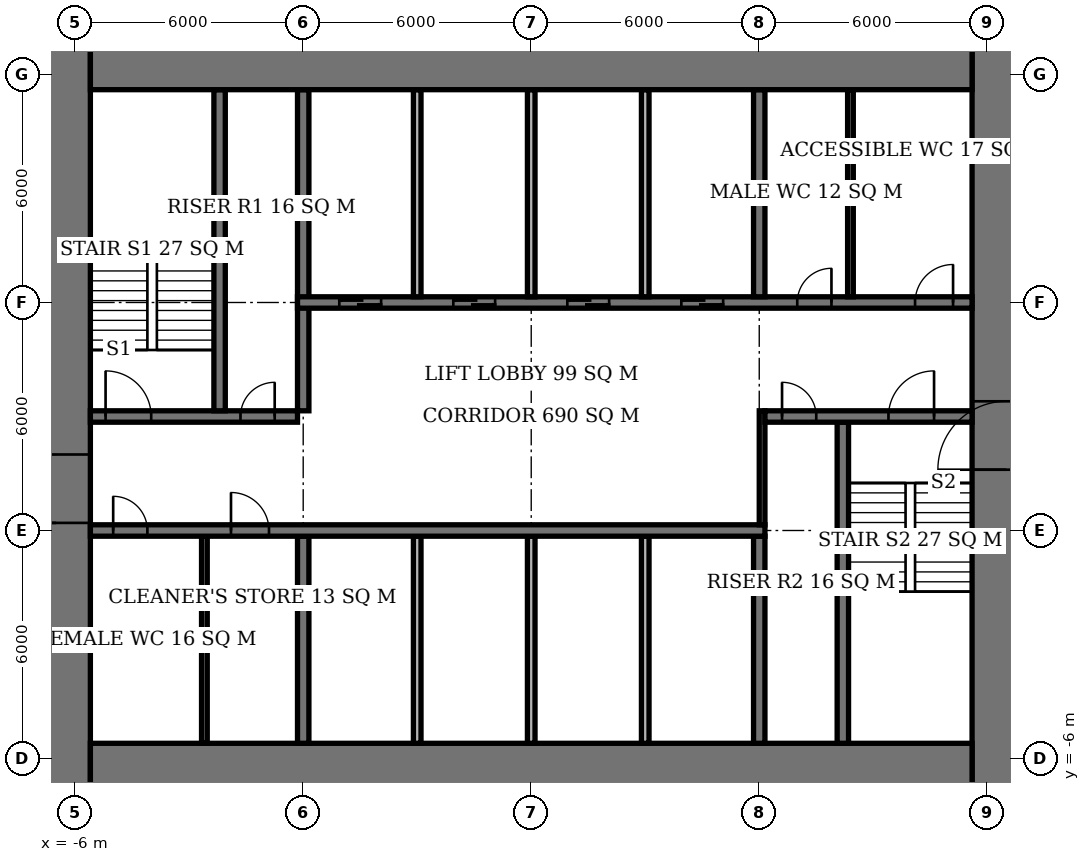
"""IFC4 building model, lengths in metres.
Left out: names, types, materials, properties, quantities, classifications, styles, units other than length and angle.
Written with IfcOpenShell. Run it as: python <this file> out.ifc"""

import sys

from ifc_helpers import new_model, si_unit, direction, frame, frame_2d, origin, place, context, subcontext, project, spatial, rectangle, extrude, element, fill, save


model = new_model("IFC4")
c1 = context("Model", 3, precision=1e-05, world=origin(), true_north=direction((0.0, 1.0)))
c2 = subcontext(c1, "Body", "Model", "MODEL_VIEW")
j1 = project(units=[si_unit("LENGTHUNIT", "METRE"), si_unit("PLANEANGLEUNIT", "RADIAN")], contexts=[c1])
p1 = place(None, origin())
s1 = spatial("IfcSite", under=j1, at=p1, CompositionType="ELEMENT")
p2 = place(p1, origin())
s2 = spatial("IfcBuilding", under=s1, at=p2, CompositionType="ELEMENT")
p3 = place(p2, frame((0.0, 0.0, 22.1)))
s3 = spatial("IfcBuildingStorey", under=s2, at=p3, CompositionType="ELEMENT", Elevation=22.1)
for number, where, z_axis, x_axis in (
    (1, (-5.6, -6.6, 0.0), (0.0, 0.0, 1.0), (1.0, 0.0, 0.0)),
    (2, (-5.6, 12.6, 0.0), (0.0, 0.0, 1.0), (1.0, 0.0, 0.0)),
):
    element("IfcWall", number, at=place(p3, frame(where, z_axis=z_axis, x_axis=x_axis)), inside=s3, PredefinedType="SHEAR", context=c2, shape_type="SweptSolid", body=[
        extrude(rectangle(XDim=23.2, YDim=2.0, at=frame_2d((11.6, 0.0))), origin(), (0.0, 0.0, 1.0), 3.9),
    ])
p4 = place(p3, frame((-6.5, -7.6, 0.0), z_axis=(0.0, 0.0, 1.0), x_axis=(0.0, 1.0, 0.0)))
e3 = element("IfcWall", 3, at=p4, inside=s3, PredefinedType="SHEAR", context=c2, shape_type="SweptSolid", body=[
    extrude(rectangle(XDim=21.2, YDim=1.8, at=frame_2d((10.6, 0.0))), origin(), (0.0, 0.0, 1.0), 3.9),
])
p5 = place(p4, frame((7.8, 0.0, 0.0)))
e4 = element("IfcOpeningElement", 4, at=p5, cuts=e3, PredefinedType="OPENING", context=c2, shape_type="SweptSolid", body=[
    extrude(rectangle(XDim=1.8, YDim=2.4, at=frame_2d((0.9, 1.2))), frame((0.0, 0.91, 0.0), z_axis=(0.0, -1.0, 0.0), x_axis=(1.0, 0.0, 0.0)), (0.0, 0.0, 1.0), 1.82),
])
p6 = place(p3, frame((18.5, -7.6, 0.0), z_axis=(0.0, 0.0, 1.0), x_axis=(0.0, 1.0, 0.0)))
e5 = element("IfcWall", 5, at=p6, inside=s3, PredefinedType="SHEAR", context=c2, shape_type="SweptSolid", body=[
    extrude(rectangle(XDim=21.2, YDim=1.8, at=frame_2d((10.6, 0.0))), origin(), (0.0, 0.0, 1.0), 3.9),
])
p7 = place(p6, frame((9.2, 0.0, 0.0)))
e6 = element("IfcOpeningElement", 6, at=p7, cuts=e5, PredefinedType="OPENING", context=c2, shape_type="SweptSolid", body=[
    extrude(rectangle(XDim=1.8, YDim=2.4, at=frame_2d((0.9, 1.2))), frame((0.0, 0.91, 0.0), z_axis=(0.0, -1.0, 0.0), x_axis=(1.0, 0.0, 0.0)), (0.0, 0.0, 1.0), 1.82),
])
p8 = place(p3, frame((-5.6, 0.0, 0.0), z_axis=(0.0, 0.0, 1.0), x_axis=(1.0, 0.0, 0.0)))
e7 = element("IfcWall", 7, at=p8, inside=s3, PredefinedType="SHEAR", context=c2, shape_type="SweptSolid", body=[
    extrude(rectangle(XDim=17.75, YDim=0.3, at=frame_2d((8.875, 0.0))), origin(), (0.0, 0.0, 1.0), 3.9),
])
p9 = place(p8, frame((0.6, 0.0, 0.0)))
e8 = element("IfcOpeningElement", 8, at=p9, cuts=e7, PredefinedType="OPENING", context=c2, shape_type="SweptSolid", body=[
    extrude(rectangle(XDim=0.9, YDim=2.1, at=frame_2d((0.45, 1.05))), frame((0.0, 0.16, 0.0), z_axis=(0.0, -1.0, 0.0), x_axis=(1.0, 0.0, 0.0)), (0.0, 0.0, 1.0), 0.32),
])
p10 = place(p8, frame((3.7, 0.0, 0.0)))
e9 = element("IfcOpeningElement", 9, at=p10, cuts=e7, PredefinedType="OPENING", context=c2, shape_type="SweptSolid", body=[
    extrude(rectangle(XDim=1.0, YDim=2.1, at=frame_2d((0.5, 1.05))), frame((0.0, 0.16, 0.0), z_axis=(0.0, -1.0, 0.0), x_axis=(1.0, 0.0, 0.0)), (0.0, 0.0, 1.0), 0.32),
])
p11 = place(p3, frame((-5.6, 3.0, 0.0), z_axis=(0.0, 0.0, 1.0), x_axis=(1.0, 0.0, 0.0)))
e10 = element("IfcWall", 10, at=p11, inside=s3, PredefinedType="SHEAR", context=c2, shape_type="SweptSolid", body=[
    extrude(rectangle(XDim=5.45, YDim=0.3, at=frame_2d((2.725, 0.0))), origin(), (0.0, 0.0, 1.0), 3.9),
])
p12 = place(p11, frame((0.4, 0.0, 0.0)))
e11 = element("IfcOpeningElement", 11, at=p12, cuts=e10, PredefinedType="OPENING", context=c2, shape_type="SweptSolid", body=[
    extrude(rectangle(XDim=1.2, YDim=2.1, at=frame_2d((0.6, 1.05))), frame((0.0, 0.16, 0.0), z_axis=(0.0, -1.0, 0.0), x_axis=(1.0, 0.0, 0.0)), (0.0, 0.0, 1.0), 0.32),
])
p13 = place(p11, frame((3.95, 0.0, 0.0)))
e12 = element("IfcOpeningElement", 12, at=p13, cuts=e10, PredefinedType="OPENING", context=c2, shape_type="SweptSolid", body=[
    extrude(rectangle(XDim=0.9, YDim=2.1, at=frame_2d((0.45, 1.05))), frame((0.0, 0.16, 0.0), z_axis=(0.0, -1.0, 0.0), x_axis=(1.0, 0.0, 0.0)), (0.0, 0.0, 1.0), 0.32),
])
p14 = place(p3, frame((12.15, 3.0, 0.0), z_axis=(0.0, 0.0, 1.0), x_axis=(1.0, 0.0, 0.0)))
e13 = element("IfcWall", 13, at=p14, inside=s3, PredefinedType="SHEAR", context=c2, shape_type="SweptSolid", body=[
    extrude(rectangle(XDim=5.45, YDim=0.3, at=frame_2d((2.725, 0.0))), origin(), (0.0, 0.0, 1.0), 3.9),
])
p15 = place(p14, frame((3.25, 0.0, 0.0)))
e14 = element("IfcOpeningElement", 14, at=p15, cuts=e13, PredefinedType="OPENING", context=c2, shape_type="SweptSolid", body=[
    extrude(rectangle(XDim=1.2, YDim=2.1, at=frame_2d((0.6, 1.05))), frame((0.0, 0.16, 0.0), z_axis=(0.0, -1.0, 0.0), x_axis=(1.0, 0.0, 0.0)), (0.0, 0.0, 1.0), 0.32),
])
p16 = place(p14, frame((0.45, 0.0, 0.0)))
e15 = element("IfcOpeningElement", 15, at=p16, cuts=e13, PredefinedType="OPENING", context=c2, shape_type="SweptSolid", body=[
    extrude(rectangle(XDim=0.9, YDim=2.1, at=frame_2d((0.45, 1.05))), frame((0.0, 0.16, 0.0), z_axis=(0.0, -1.0, 0.0), x_axis=(1.0, 0.0, 0.0)), (0.0, 0.0, 1.0), 0.32),
])
p17 = place(p3, frame((-0.15, 6.0, 0.0), z_axis=(0.0, 0.0, 1.0), x_axis=(1.0, 0.0, 0.0)))
e16 = element("IfcWall", 16, at=p17, inside=s3, PredefinedType="SHEAR", context=c2, shape_type="SweptSolid", body=[
    extrude(rectangle(XDim=17.75, YDim=0.3, at=frame_2d((8.875, 0.0))), origin(), (0.0, 0.0, 1.0), 3.9),
])
p18 = place(p17, frame((13.15, 0.0, 0.0)))
e17 = element("IfcOpeningElement", 17, at=p18, cuts=e16, PredefinedType="OPENING", context=c2, shape_type="SweptSolid", body=[
    extrude(rectangle(XDim=0.9, YDim=2.1, at=frame_2d((0.45, 1.05))), frame((0.0, 0.16, 0.0), z_axis=(0.0, -1.0, 0.0), x_axis=(1.0, 0.0, 0.0)), (0.0, 0.0, 1.0), 0.32),
])
p19 = place(p17, frame((16.25, 0.0, 0.0)))
e18 = element("IfcOpeningElement", 18, at=p19, cuts=e16, PredefinedType="OPENING", context=c2, shape_type="SweptSolid", body=[
    extrude(rectangle(XDim=1.0, YDim=2.1, at=frame_2d((0.5, 1.05))), frame((0.0, 0.16, 0.0), z_axis=(0.0, -1.0, 0.0), x_axis=(1.0, 0.0, 0.0)), (0.0, 0.0, 1.0), 0.32),
])
p20 = place(p17, frame((1.1, 0.0, 0.0)))
e19 = element("IfcOpeningElement", 19, at=p20, cuts=e16, PredefinedType="OPENING", context=c2, shape_type="SweptSolid", body=[
    extrude(rectangle(XDim=1.1, YDim=2.1, at=frame_2d((0.55, 1.05))), frame((0.0, 0.16, 0.0), z_axis=(0.0, -1.0, 0.0), x_axis=(1.0, 0.0, 0.0)), (0.0, 0.0, 1.0), 0.32),
])
p21 = place(p17, frame((4.1, 0.0, 0.0)))
e20 = element("IfcOpeningElement", 20, at=p21, cuts=e16, PredefinedType="OPENING", context=c2, shape_type="SweptSolid", body=[
    extrude(rectangle(XDim=1.1, YDim=2.1, at=frame_2d((0.55, 1.05))), frame((0.0, 0.16, 0.0), z_axis=(0.0, -1.0, 0.0), x_axis=(1.0, 0.0, 0.0)), (0.0, 0.0, 1.0), 0.32),
])
p22 = place(p17, frame((7.1, 0.0, 0.0)))
e21 = element("IfcOpeningElement", 21, at=p22, cuts=e16, PredefinedType="OPENING", context=c2, shape_type="SweptSolid", body=[
    extrude(rectangle(XDim=1.1, YDim=2.1, at=frame_2d((0.55, 1.05))), frame((0.0, 0.16, 0.0), z_axis=(0.0, -1.0, 0.0), x_axis=(1.0, 0.0, 0.0)), (0.0, 0.0, 1.0), 0.32),
])
p23 = place(p17, frame((10.1, 0.0, 0.0)))
e22 = element("IfcOpeningElement", 22, at=p23, cuts=e16, PredefinedType="OPENING", context=c2, shape_type="SweptSolid", body=[
    extrude(rectangle(XDim=1.1, YDim=2.1, at=frame_2d((0.55, 1.05))), frame((0.0, 0.16, 0.0), z_axis=(0.0, -1.0, 0.0), x_axis=(1.0, 0.0, 0.0)), (0.0, 0.0, 1.0), 0.32),
])
p24 = place(p3, frame((0.0, -5.6, 0.0), z_axis=(0.0, 0.0, 1.0), x_axis=(0.0, 1.0, 0.0)))
e23 = element("IfcWall", 23, at=p24, inside=s3, PredefinedType="SHEAR", context=c2, shape_type="SweptSolid", body=[
    extrude(rectangle(XDim=5.45, YDim=0.3, at=frame_2d((2.725, 0.0))), origin(), (0.0, 0.0, 1.0), 3.9),
])
p25 = place(p3, frame((0.0, 3.15, 0.0), z_axis=(0.0, 0.0, 1.0), x_axis=(0.0, 1.0, 0.0)))
e24 = element("IfcWall", 24, at=p25, inside=s3, PredefinedType="SHEAR", context=c2, shape_type="SweptSolid", body=[
    extrude(rectangle(XDim=8.45, YDim=0.3, at=frame_2d((4.225, 0.0))), origin(), (0.0, 0.0, 1.0), 3.9),
])
for number, where, z_axis, x_axis in (
    (25, (12.0, -5.6, 0.0), (0.0, 0.0, 1.0), (0.0, 1.0, 0.0)),
    (26, (12.0, 6.15, 0.0), (0.0, 0.0, 1.0), (0.0, 1.0, 0.0)),
):
    element("IfcWall", number, at=place(p3, frame(where, z_axis=z_axis, x_axis=x_axis)), inside=s3, PredefinedType="SHEAR", context=c2, shape_type="SweptSolid", body=[
        extrude(rectangle(XDim=5.45, YDim=0.3, at=frame_2d((2.725, 0.0))), origin(), (0.0, 0.0, 1.0), 3.9),
    ])
for number, where, z_axis, x_axis in (
    (27, (-2.2, 3.15, 0.0), (0.0, 0.0, 1.0), (0.0, 1.0, 0.0)),
    (28, (14.2, -5.6, 0.0), (0.0, 0.0, 1.0), (0.0, 1.0, 0.0)),
):
    element("IfcWall", number, at=place(p3, frame(where, z_axis=z_axis, x_axis=x_axis)), inside=s3, PredefinedType="SHEAR", context=c2, shape_type="SweptSolid", body=[
        extrude(rectangle(XDim=8.45, YDim=0.3, at=frame_2d((4.225, 0.0))), origin(), (0.0, 0.0, 1.0), 3.9),
    ])
for number, where, z_axis, x_axis in (
    (29, (3.0, 6.15, 0.0), (0.0, 0.0, 1.0), (0.0, 1.0, 0.0)),
    (30, (6.0, 6.15, 0.0), (0.0, 0.0, 1.0), (0.0, 1.0, 0.0)),
    (31, (9.0, 6.15, 0.0), (0.0, 0.0, 1.0), (0.0, 1.0, 0.0)),
    (32, (3.0, -5.6, 0.0), (0.0, 0.0, 1.0), (0.0, 1.0, 0.0)),
    (33, (6.0, -5.6, 0.0), (0.0, 0.0, 1.0), (0.0, 1.0, 0.0)),
    (34, (9.0, -5.6, 0.0), (0.0, 0.0, 1.0), (0.0, 1.0, 0.0)),
):
    element("IfcWall", number, at=place(p3, frame(where, z_axis=z_axis, x_axis=x_axis)), inside=s3, PredefinedType="SOLIDWALL", context=c2, shape_type="SweptSolid", body=[
        extrude(rectangle(XDim=5.45, YDim=0.2, at=frame_2d((2.725, 0.0))), origin(), (0.0, 0.0, 1.0), 3.9),
    ])
for number, where, z_axis, x_axis in (
    (35, (-2.6, -5.6, 0.0), (0.0, 0.0, 1.0), (0.0, 1.0, 0.0)),
    (36, (14.4, 6.15, 0.0), (0.0, 0.0, 1.0), (0.0, 1.0, 0.0)),
):
    element("IfcWall", number, at=place(p3, frame(where, z_axis=z_axis, x_axis=x_axis)), inside=s3, PredefinedType="PLUMBINGWALL", context=c2, shape_type="SweptSolid", body=[
        extrude(rectangle(XDim=5.45, YDim=0.15, at=frame_2d((2.725, 0.0))), origin(), (0.0, 0.0, 1.0), 3.65),
    ])
p26 = place(p3, frame((12.075, 0.15, 0.0), z_axis=(0.0, 0.0, 1.0), x_axis=(0.0, 1.0, 0.0)))
e37 = element("IfcWall", 37, at=p26, inside=s3, PredefinedType="PARTITIONING", context=c2, shape_type="SweptSolid", body=[
    extrude(rectangle(XDim=3.0, YDim=0.15, at=frame_2d((1.5, 0.0))), origin(), (0.0, 0.0, 1.0), 3.65),
])
p27 = place(p5, origin())
e38 = element("IfcDoor", 38, at=p27, inside=s3, OperationType="DOUBLE_DOOR_SINGLE_SWING", PredefinedType="DOOR", context=c2, shape_type="SweptSolid", body=[
    extrude(rectangle(XDim=1.8, YDim=2.4, at=frame_2d((0.9, 1.2))), frame((0.0, 0.025, 0.0), z_axis=(0.0, -1.0, 0.0), x_axis=(1.0, 0.0, 0.0)), (0.0, 0.0, 1.0), 0.05),
])
fill(e4, e38)
p28 = place(p7, origin())
e39 = element("IfcDoor", 39, at=p28, inside=s3, OperationType="DOUBLE_DOOR_SINGLE_SWING", PredefinedType="DOOR", context=c2, shape_type="SweptSolid", body=[
    extrude(rectangle(XDim=1.8, YDim=2.4, at=frame_2d((0.9, 1.2))), frame((0.0, 0.025, 0.0), z_axis=(0.0, -1.0, 0.0), x_axis=(1.0, 0.0, 0.0)), (0.0, 0.0, 1.0), 0.05),
])
fill(e6, e39)
p29 = place(p12, origin())
e40 = element("IfcDoor", 40, at=p29, inside=s3, OperationType="SINGLE_SWING_LEFT", PredefinedType="DOOR", context=c2, shape_type="SweptSolid", body=[
    extrude(rectangle(XDim=1.2, YDim=2.1, at=frame_2d((0.6, 1.05))), frame((0.0, 0.025, 0.0), z_axis=(0.0, -1.0, 0.0), x_axis=(1.0, 0.0, 0.0)), (0.0, 0.0, 1.0), 0.05),
])
fill(e11, e40)
p30 = place(p13, origin())
e41 = element("IfcDoor", 41, at=p30, inside=s3, OperationType="SINGLE_SWING_RIGHT", PredefinedType="DOOR", context=c2, shape_type="SweptSolid", body=[
    extrude(rectangle(XDim=0.9, YDim=2.1, at=frame_2d((0.45, 1.05))), frame((0.0, 0.025, 0.0), z_axis=(0.0, -1.0, 0.0), x_axis=(1.0, 0.0, 0.0)), (0.0, 0.0, 1.0), 0.05),
])
fill(e12, e41)
p31 = place(p15, origin())
e42 = element("IfcDoor", 42, at=p31, inside=s3, OperationType="SINGLE_SWING_RIGHT", PredefinedType="DOOR", context=c2, shape_type="SweptSolid", body=[
    extrude(rectangle(XDim=1.2, YDim=2.1, at=frame_2d((0.6, 1.05))), frame((0.0, 0.025, 0.0), z_axis=(0.0, -1.0, 0.0), x_axis=(1.0, 0.0, 0.0)), (0.0, 0.0, 1.0), 0.05),
])
fill(e14, e42)
p32 = place(p16, origin())
e43 = element("IfcDoor", 43, at=p32, inside=s3, OperationType="SINGLE_SWING_LEFT", PredefinedType="DOOR", context=c2, shape_type="SweptSolid", body=[
    extrude(rectangle(XDim=0.9, YDim=2.1, at=frame_2d((0.45, 1.05))), frame((0.0, 0.025, 0.0), z_axis=(0.0, -1.0, 0.0), x_axis=(1.0, 0.0, 0.0)), (0.0, 0.0, 1.0), 0.05),
])
fill(e15, e43)
p33 = place(p9, origin())
e44 = element("IfcDoor", 44, at=p33, inside=s3, OperationType="SINGLE_SWING_LEFT", PredefinedType="DOOR", context=c2, shape_type="SweptSolid", body=[
    extrude(rectangle(XDim=0.9, YDim=2.1, at=frame_2d((0.45, 1.05))), frame((0.0, 0.025, 0.0), z_axis=(0.0, -1.0, 0.0), x_axis=(1.0, 0.0, 0.0)), (0.0, 0.0, 1.0), 0.05),
])
fill(e8, e44)
p34 = place(p10, origin())
e45 = element("IfcDoor", 45, at=p34, inside=s3, OperationType="SINGLE_SWING_LEFT", PredefinedType="DOOR", context=c2, shape_type="SweptSolid", body=[
    extrude(rectangle(XDim=1.0, YDim=2.1, at=frame_2d((0.5, 1.05))), frame((0.0, 0.025, 0.0), z_axis=(0.0, -1.0, 0.0), x_axis=(1.0, 0.0, 0.0)), (0.0, 0.0, 1.0), 0.05),
])
fill(e9, e45)
p35 = place(p18, origin())
e46 = element("IfcDoor", 46, at=p35, inside=s3, OperationType="SINGLE_SWING_RIGHT", PredefinedType="DOOR", context=c2, shape_type="SweptSolid", body=[
    extrude(rectangle(XDim=0.9, YDim=2.1, at=frame_2d((0.45, 1.05))), frame((0.0, 0.025, 0.0), z_axis=(0.0, -1.0, 0.0), x_axis=(1.0, 0.0, 0.0)), (0.0, 0.0, 1.0), 0.05),
])
fill(e17, e46)
p36 = place(p19, origin())
e47 = element("IfcDoor", 47, at=p36, inside=s3, OperationType="SINGLE_SWING_RIGHT", PredefinedType="DOOR", context=c2, shape_type="SweptSolid", body=[
    extrude(rectangle(XDim=1.0, YDim=2.1, at=frame_2d((0.5, 1.05))), frame((0.0, 0.025, 0.0), z_axis=(0.0, -1.0, 0.0), x_axis=(1.0, 0.0, 0.0)), (0.0, 0.0, 1.0), 0.05),
])
fill(e18, e47)
p37 = place(p20, origin())
e48 = element("IfcDoor", 48, at=p37, inside=s3, OperationType="DOUBLE_DOOR_SLIDING", PredefinedType="USERDEFINED", context=c2, shape_type="SweptSolid", body=[
    extrude(rectangle(XDim=1.1, YDim=2.1, at=frame_2d((0.55, 1.05))), frame((0.0, 0.025, 0.0), z_axis=(0.0, -1.0, 0.0), x_axis=(1.0, 0.0, 0.0)), (0.0, 0.0, 1.0), 0.05),
])
fill(e19, e48)
p38 = place(p21, origin())
e49 = element("IfcDoor", 49, at=p38, inside=s3, OperationType="DOUBLE_DOOR_SLIDING", PredefinedType="USERDEFINED", context=c2, shape_type="SweptSolid", body=[
    extrude(rectangle(XDim=1.1, YDim=2.1, at=frame_2d((0.55, 1.05))), frame((0.0, 0.025, 0.0), z_axis=(0.0, -1.0, 0.0), x_axis=(1.0, 0.0, 0.0)), (0.0, 0.0, 1.0), 0.05),
])
fill(e20, e49)
p39 = place(p22, origin())
e50 = element("IfcDoor", 50, at=p39, inside=s3, OperationType="DOUBLE_DOOR_SLIDING", PredefinedType="USERDEFINED", context=c2, shape_type="SweptSolid", body=[
    extrude(rectangle(XDim=1.1, YDim=2.1, at=frame_2d((0.55, 1.05))), frame((0.0, 0.025, 0.0), z_axis=(0.0, -1.0, 0.0), x_axis=(1.0, 0.0, 0.0)), (0.0, 0.0, 1.0), 0.05),
])
fill(e21, e50)
p40 = place(p23, origin())
e51 = element("IfcDoor", 51, at=p40, inside=s3, OperationType="DOUBLE_DOOR_SLIDING", PredefinedType="USERDEFINED", context=c2, shape_type="SweptSolid", body=[
    extrude(rectangle(XDim=1.1, YDim=2.1, at=frame_2d((0.55, 1.05))), frame((0.0, 0.025, 0.0), z_axis=(0.0, -1.0, 0.0), x_axis=(1.0, 0.0, 0.0)), (0.0, 0.0, 1.0), 0.05),
])
fill(e22, e51)
save(model, sys.argv[1])
